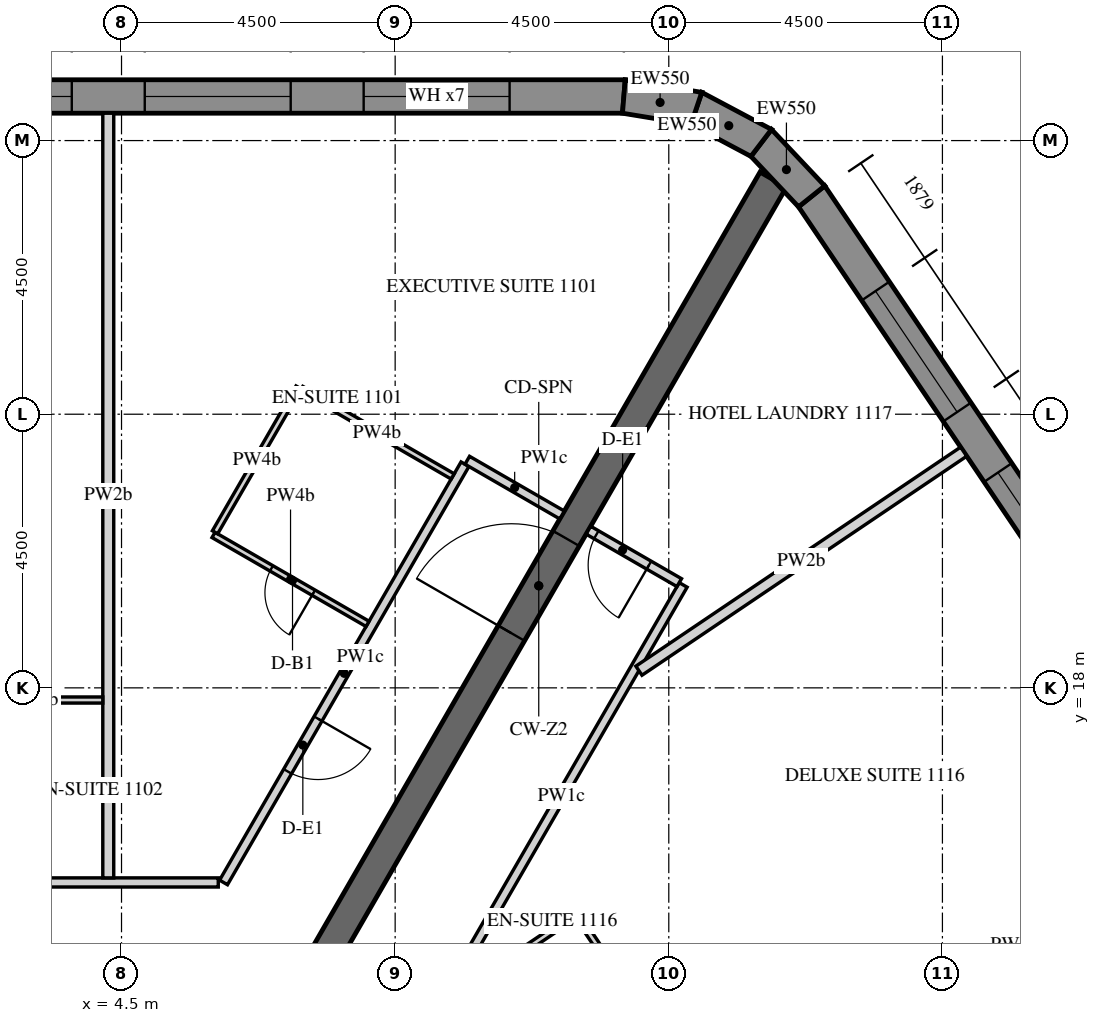
"""IFC4 building model, lengths in metres.
Left out: names, types, materials, properties, quantities, classifications, styles, units other than length and angle.
Written with IfcOpenShell. Run it as: python <this file> out.ifc"""

import sys

from ifc_helpers import new_model, si_unit, direction, frame, frame_2d, origin, place, context, subcontext, project, spatial, polyline, rectangle, outline, extrude, element, fill, save


model = new_model("IFC4")
c1 = context("Model", 3, precision=1e-05, world=origin(), true_north=direction((0.0, 1.0)))
c2 = subcontext(c1, "Body", "Model", "MODEL_VIEW")
j1 = project(units=[si_unit("LENGTHUNIT", "METRE"), si_unit("PLANEANGLEUNIT", "RADIAN")], contexts=[c1])
p1 = place(None, origin())
s1 = spatial("IfcSite", under=j1, at=p1, CompositionType="ELEMENT")
p2 = place(p1, origin())
s2 = spatial("IfcBuilding", under=s1, at=p2, CompositionType="ELEMENT")
p3 = place(p2, frame((0.0, 0.0, 156.6)))
s3 = spatial("IfcBuildingStorey", under=s2, at=p3, CompositionType="ELEMENT", Elevation=156.6)
p4 = place(p3, frame((12.761, 27.725, -0.15), z_axis=(0.0, 0.0, 1.0), x_axis=(-1.0, 0.0, 0.0)))
e1 = element("IfcWall", 1, at=p4, inside=s3, PredefinedType="SOLIDWALL", context=c2, shape_type="SweptSolid", body=[
    extrude(outline(polyline([(-0.022, -0.275), (27.783, -0.275), (27.732, 0.275), (0.022, 0.275), (-0.022, -0.275)])), origin(), (0.0, 0.0, 1.0), 3.9),
])
p5 = place(p4, frame((1.879, 0.0, 1.05)))
e2 = element("IfcOpeningElement", 2, at=p5, cuts=e1, PredefinedType="OPENING", context=c2, shape_type="SweptSolid", body=[
    extrude(rectangle(XDim=2.4, YDim=2.4, at=frame_2d((1.2, 1.2))), frame((0.0, 0.285, 0.0), z_axis=(0.0, -1.0, 0.0), x_axis=(1.0, 0.0, 0.0)), (0.0, 0.0, 1.0), 0.57),
])
p6 = place(p4, frame((5.479, 0.0, 1.05)))
e3 = element("IfcOpeningElement", 3, at=p6, cuts=e1, PredefinedType="OPENING", context=c2, shape_type="SweptSolid", body=[
    extrude(rectangle(XDim=2.4, YDim=2.4, at=frame_2d((1.2, 1.2))), frame((0.0, 0.285, 0.0), z_axis=(0.0, -1.0, 0.0), x_axis=(1.0, 0.0, 0.0)), (0.0, 0.0, 1.0), 0.57),
])
p7 = place(p4, frame((9.079, 0.0, 1.05)))
e4 = element("IfcOpeningElement", 4, at=p7, cuts=e1, PredefinedType="OPENING", context=c2, shape_type="SweptSolid", body=[
    extrude(rectangle(XDim=2.4, YDim=2.4, at=frame_2d((1.2, 1.2))), frame((0.0, 0.285, 0.0), z_axis=(0.0, -1.0, 0.0), x_axis=(1.0, 0.0, 0.0)), (0.0, 0.0, 1.0), 0.57),
])
p8 = place(p4, frame((12.679, 0.0, 1.05)))
e5 = element("IfcOpeningElement", 5, at=p8, cuts=e1, PredefinedType="OPENING", context=c2, shape_type="SweptSolid", body=[
    extrude(rectangle(XDim=2.4, YDim=2.4, at=frame_2d((1.2, 1.2))), frame((0.0, 0.285, 0.0), z_axis=(0.0, -1.0, 0.0), x_axis=(1.0, 0.0, 0.0)), (0.0, 0.0, 1.0), 0.57),
])
p9 = place(p4, frame((16.279, 0.0, 1.05)))
e6 = element("IfcOpeningElement", 6, at=p9, cuts=e1, PredefinedType="OPENING", context=c2, shape_type="SweptSolid", body=[
    extrude(rectangle(XDim=2.4, YDim=2.4, at=frame_2d((1.2, 1.2))), frame((0.0, 0.285, 0.0), z_axis=(0.0, -1.0, 0.0), x_axis=(1.0, 0.0, 0.0)), (0.0, 0.0, 1.0), 0.57),
])
p10 = place(p4, frame((19.879, 0.0, 1.05)))
e7 = element("IfcOpeningElement", 7, at=p10, cuts=e1, PredefinedType="OPENING", context=c2, shape_type="SweptSolid", body=[
    extrude(rectangle(XDim=2.4, YDim=2.4, at=frame_2d((1.2, 1.2))), frame((0.0, 0.285, 0.0), z_axis=(0.0, -1.0, 0.0), x_axis=(1.0, 0.0, 0.0)), (0.0, 0.0, 1.0), 0.57),
])
p11 = place(p4, frame((23.479, 0.0, 1.05)))
e8 = element("IfcOpeningElement", 8, at=p11, cuts=e1, PredefinedType="OPENING", context=c2, shape_type="SweptSolid", body=[
    extrude(rectangle(XDim=2.4, YDim=2.4, at=frame_2d((1.2, 1.2))), frame((0.0, 0.285, 0.0), z_axis=(0.0, -1.0, 0.0), x_axis=(1.0, 0.0, 0.0)), (0.0, 0.0, 1.0), 0.57),
])
p12 = place(p3, frame((31.371, 3.071, -0.15), z_axis=(0.0, 0.0, 1.0), x_axis=(-0.559189891278, 0.829039604297, 0.0)))
e9 = element("IfcWall", 9, at=p12, inside=s3, PredefinedType="SOLIDWALL", context=c2, shape_type="SweptSolid", body=[
    extrude(outline(polyline([(-0.026, -0.275), (27.781, -0.275), (27.736, 0.275), (0.026, 0.275), (-0.026, -0.275)])), origin(), (0.0, 0.0, 1.0), 3.9),
])
p13 = place(p12, frame((1.879, 0.0, 1.05)))
e10 = element("IfcOpeningElement", 10, at=p13, cuts=e9, PredefinedType="OPENING", context=c2, shape_type="SweptSolid", body=[
    extrude(rectangle(XDim=2.4, YDim=2.4, at=frame_2d((1.2, 1.2))), frame((0.0, 0.285, 0.0), z_axis=(0.0, -1.0, 0.0), x_axis=(1.0, 0.0, 0.0)), (0.0, 0.0, 1.0), 0.57),
])
p14 = place(p12, frame((5.479, 0.0, 1.05)))
e11 = element("IfcOpeningElement", 11, at=p14, cuts=e9, PredefinedType="OPENING", context=c2, shape_type="SweptSolid", body=[
    extrude(rectangle(XDim=2.4, YDim=2.4, at=frame_2d((1.2, 1.2))), frame((0.0, 0.285, 0.0), z_axis=(0.0, -1.0, 0.0), x_axis=(1.0, 0.0, 0.0)), (0.0, 0.0, 1.0), 0.57),
])
p15 = place(p12, frame((9.079, 0.0, 1.05)))
e12 = element("IfcOpeningElement", 12, at=p15, cuts=e9, PredefinedType="OPENING", context=c2, shape_type="SweptSolid", body=[
    extrude(rectangle(XDim=2.4, YDim=2.4, at=frame_2d((1.2, 1.2))), frame((0.0, 0.285, 0.0), z_axis=(0.0, -1.0, 0.0), x_axis=(1.0, 0.0, 0.0)), (0.0, 0.0, 1.0), 0.57),
])
p16 = place(p12, frame((12.679, 0.0, 1.05)))
e13 = element("IfcOpeningElement", 13, at=p16, cuts=e9, PredefinedType="OPENING", context=c2, shape_type="SweptSolid", body=[
    extrude(rectangle(XDim=2.4, YDim=2.4, at=frame_2d((1.2, 1.2))), frame((0.0, 0.285, 0.0), z_axis=(0.0, -1.0, 0.0), x_axis=(1.0, 0.0, 0.0)), (0.0, 0.0, 1.0), 0.57),
])
p17 = place(p12, frame((16.279, 0.0, 1.05)))
e14 = element("IfcOpeningElement", 14, at=p17, cuts=e9, PredefinedType="OPENING", context=c2, shape_type="SweptSolid", body=[
    extrude(rectangle(XDim=2.4, YDim=2.4, at=frame_2d((1.2, 1.2))), frame((0.0, 0.285, 0.0), z_axis=(0.0, -1.0, 0.0), x_axis=(1.0, 0.0, 0.0)), (0.0, 0.0, 1.0), 0.57),
])
p18 = place(p12, frame((19.879, 0.0, 1.05)))
e15 = element("IfcOpeningElement", 15, at=p18, cuts=e9, PredefinedType="OPENING", context=c2, shape_type="SweptSolid", body=[
    extrude(rectangle(XDim=2.4, YDim=2.4, at=frame_2d((1.2, 1.2))), frame((0.0, 0.285, 0.0), z_axis=(0.0, -1.0, 0.0), x_axis=(1.0, 0.0, 0.0)), (0.0, 0.0, 1.0), 0.57),
])
p19 = place(p12, frame((23.479, 0.0, 1.05)))
e16 = element("IfcOpeningElement", 16, at=p19, cuts=e9, PredefinedType="OPENING", context=c2, shape_type="SweptSolid", body=[
    extrude(rectangle(XDim=2.4, YDim=2.4, at=frame_2d((1.2, 1.2))), frame((0.0, 0.285, 0.0), z_axis=(0.0, -1.0, 0.0), x_axis=(1.0, 0.0, 0.0)), (0.0, 0.0, 1.0), 0.57),
])
p20 = place(p3, frame((15.849, 26.083, -0.15), z_axis=(0.0, 0.0, 1.0), x_axis=(-0.686196220404, 0.727416488061, 0.0)))
e17 = element("IfcWall", 17, at=p20, inside=s3, PredefinedType="SOLIDWALL", context=c2, shape_type="SweptSolid", body=[
    extrude(outline(polyline([(-0.022, -0.275), (1.253, -0.275), (1.163, 0.275), (0.022, 0.275), (-0.022, -0.275)])), origin(), (0.0, 0.0, 1.0), 3.9),
])
p21 = place(p3, frame((15.02, 26.962, -0.15), z_axis=(0.0, 0.0, 1.0), x_axis=(-0.882950818639, 0.469465495926, 0.0)))
e18 = element("IfcWall", 18, at=p21, inside=s3, PredefinedType="SOLIDWALL", context=c2, shape_type="SweptSolid", body=[
    extrude(outline(polyline([(-0.045, -0.275), (1.253, -0.275), (1.163, 0.275), (0.045, 0.275), (-0.045, -0.275)])), origin(), (0.0, 0.0, 1.0), 3.9),
])
p22 = place(p3, frame((13.953, 27.529, -0.15), z_axis=(0.0, 0.0, 1.0), x_axis=(-0.986751945211, 0.162236243244, 0.0)))
e19 = element("IfcWall", 19, at=p22, inside=s3, PredefinedType="SOLIDWALL", context=c2, shape_type="SweptSolid", body=[
    extrude(outline(polyline([(-0.045, -0.275), (1.231, -0.275), (1.186, 0.275), (0.045, 0.275), (-0.045, -0.275)])), origin(), (0.0, 0.0, 1.0), 3.9),
])
p23 = place(p3, frame((7.506, 13.0, -0.15), z_axis=(0.0, 0.0, 1.0), x_axis=(0.499988271576, 0.866032175087, 0.0)))
e20 = element("IfcWall", 20, at=p23, inside=s3, PredefinedType="SHEAR", context=c2, shape_type="SweptSolid", body=[
    extrude(rectangle(XDim=15.424, YDim=0.5, at=frame_2d((7.712, 0.0))), origin(), (0.0, 0.0, 1.0), 3.9),
])
p24 = place(p23, frame((6.812, 0.0, 0.15)))
e21 = element("IfcOpeningElement", 21, at=p24, cuts=e20, PredefinedType="OPENING", context=c2, shape_type="SweptSolid", body=[
    extrude(rectangle(XDim=1.8, YDim=2.4, at=frame_2d((0.9, 1.2))), frame((0.0, 0.26, 0.0), z_axis=(0.0, -1.0, 0.0), x_axis=(1.0, 0.0, 0.0)), (0.0, 0.0, 1.0), 0.52),
])
p25 = place(p3, frame((10.149, 21.678, 0.0), z_axis=(0.0, 0.0, 1.0), x_axis=(-0.499997422768, -0.866026891745, 0.0)))
e22 = element("IfcWall", 22, at=p25, inside=s3, PredefinedType="PARTITIONING", context=c2, shape_type="SweptSolid", body=[
    extrude(rectangle(XDim=7.942, YDim=0.15, at=frame_2d((3.971, 0.0))), origin(), (0.0, 0.0, 1.0), 2.823),
])
p26 = place(p25, frame((4.833, 0.0, 0.0)))
e23 = element("IfcOpeningElement", 23, at=p26, cuts=e22, PredefinedType="OPENING", context=c2, shape_type="SweptSolid", body=[
    extrude(rectangle(XDim=1.0, YDim=2.1, at=frame_2d((0.5, 1.05))), frame((0.0, 0.085, 0.0), z_axis=(0.0, -1.0, 0.0), x_axis=(1.0, 0.0, 0.0)), (0.0, 0.0, 1.0), 0.17),
])
p27 = place(p3, frame((6.091, 14.8, 0.0), z_axis=(0.0, 0.0, 1.0), x_axis=(-1.0, 0.0, 0.0)))
e24 = element("IfcWall", 24, at=p27, inside=s3, PredefinedType="PARTITIONING", context=c2, shape_type="SweptSolid", body=[
    extrude(rectangle(XDim=14.636, YDim=0.15, at=frame_2d((7.318, 0.0))), origin(), (0.0, 0.0, 1.0), 2.823),
])
p28 = place(p27, frame((7.909, 0.0, 0.0)))
e25 = element("IfcOpeningElement", 25, at=p28, cuts=e24, PredefinedType="OPENING", context=c2, shape_type="SweptSolid", body=[
    extrude(rectangle(XDim=1.0, YDim=2.1, at=frame_2d((0.5, 1.05))), frame((0.0, 0.085, 0.0), z_axis=(0.0, -1.0, 0.0), x_axis=(1.0, 0.0, 0.0)), (0.0, 0.0, 1.0), 0.17),
])
p29 = place(p3, frame((11.745, 20.843, 0.0), z_axis=(0.0, 0.0, 1.0), x_axis=(-0.865989075817, 0.500062916607, 0.0)))
e26 = element("IfcWall", 26, at=p29, inside=s3, PredefinedType="PARTITIONING", context=c2, shape_type="SweptSolid", body=[
    extrude(rectangle(XDim=1.8, YDim=0.15, at=frame_2d((0.9, 0.0))), origin(), (0.0, 0.0, 1.0), 2.823),
])
p30 = place(p3, frame((9.728, 12.75, 0.0), z_axis=(0.0, 0.0, 1.0), x_axis=(0.500007149838, 0.866021275784, 0.0)))
e27 = element("IfcWall", 27, at=p30, inside=s3, PredefinedType="PARTITIONING", context=c2, shape_type="SweptSolid", body=[
    extrude(rectangle(XDim=8.017, YDim=0.15, at=frame_2d((4.009, 0.0))), origin(), (0.0, 0.0, 1.0), 2.823),
])
p31 = place(p3, frame((13.672, 19.73, 0.0), z_axis=(0.0, 0.0, 1.0), x_axis=(-0.866074815912, 0.499914405916, 0.0)))
e28 = element("IfcWall", 28, at=p31, inside=s3, PredefinedType="PARTITIONING", context=c2, shape_type="SweptSolid", body=[
    extrude(rectangle(XDim=1.725, YDim=0.15, at=frame_2d((0.862, 0.0))), origin(), (0.0, 0.0, 1.0), 2.823),
])
p32 = place(p31, frame((0.575, 0.0, 0.0)))
e29 = element("IfcOpeningElement", 29, at=p32, cuts=e28, PredefinedType="OPENING", context=c2, shape_type="SweptSolid", body=[
    extrude(rectangle(XDim=1.0, YDim=2.1, at=frame_2d((0.5, 1.05))), frame((0.0, 0.085, 0.0), z_axis=(0.0, -1.0, 0.0), x_axis=(1.0, 0.0, 0.0)), (0.0, 0.0, 1.0), 0.17),
])
p33 = place(p3, frame((8.546, 19.052, 0.0), z_axis=(0.0, 0.0, 1.0), x_axis=(-0.866046596414, 0.499963291492, 0.0)))
e30 = element("IfcWall", 30, at=p33, inside=s3, PredefinedType="PARTITIONING", context=c2, shape_type="SweptSolid", body=[
    extrude(rectangle(XDim=2.925, YDim=0.1, at=frame_2d((1.462, 0.0))), origin(), (0.0, 0.0, 1.0), 2.823),
])
p34 = place(p33, frame((1.025, 0.0, 0.0)))
e31 = element("IfcOpeningElement", 31, at=p34, cuts=e30, PredefinedType="OPENING", context=c2, shape_type="SweptSolid", body=[
    extrude(rectangle(XDim=0.8, YDim=2.1, at=frame_2d((0.4, 1.05))), frame((0.0, 0.06, 0.0), z_axis=(0.0, -1.0, 0.0), x_axis=(1.0, 0.0, 0.0)), (0.0, 0.0, 1.0), 0.12),
])
p35 = place(p3, frame((6.038, 20.558, 0.0), z_axis=(0.0, 0.0, 1.0), x_axis=(0.499996545922, 0.866027397988, 0.0)))
e32 = element("IfcWall", 32, at=p35, inside=s3, PredefinedType="PARTITIONING", context=c2, shape_type="SweptSolid", body=[
    extrude(rectangle(XDim=2.75, YDim=0.1, at=frame_2d((1.375, 0.0))), origin(), (0.0, 0.0, 1.0), 2.823),
])
p36 = place(p3, frame((7.456, 22.915, 0.0), z_axis=(0.0, 0.0, 1.0), x_axis=(0.866018712932, -0.500011588718, 0.0)))
e33 = element("IfcWall", 33, at=p36, inside=s3, PredefinedType="PARTITIONING", context=c2, shape_type="SweptSolid", body=[
    extrude(rectangle(XDim=2.875, YDim=0.1, at=frame_2d((1.438, 0.0))), origin(), (0.0, 0.0, 1.0), 2.823),
])
p37 = place(p3, frame((4.282, 27.45, 0.0), z_axis=(0.0, 0.0, 1.0), x_axis=(0.0, -1.0, 0.0)))
e34 = element("IfcWall", 34, at=p37, inside=s3, PredefinedType="PARTITIONING", context=c2, shape_type="SweptSolid", body=[
    extrude(rectangle(XDim=12.575, YDim=0.18, at=frame_2d((6.288, 0.0))), origin(), (0.0, 0.0, 1.0), 2.823),
])
p38 = place(p3, frame((1.932, 17.8, 0.0), z_axis=(0.0, 0.0, 1.0), x_axis=(1.0, 0.0, 0.0)))
e35 = element("IfcWall", 35, at=p38, inside=s3, PredefinedType="PARTITIONING", context=c2, shape_type="SweptSolid", body=[
    extrude(rectangle(XDim=2.26, YDim=0.1, at=frame_2d((1.13, 0.0))), origin(), (0.0, 0.0, 1.0), 2.823),
])
p39 = place(p3, frame((9.87, 12.846, 0.0), z_axis=(0.0, 0.0, 1.0), x_axis=(0.829045266323, 0.559181496821, 0.0)))
e36 = element("IfcWall", 36, at=p39, inside=s3, PredefinedType="PARTITIONING", context=c2, shape_type="SweptSolid", body=[
    extrude(rectangle(XDim=2.548, YDim=0.1, at=frame_2d((1.274, 0.0))), origin(), (0.0, 0.0, 1.0), 2.823),
])
p40 = place(p3, frame((12.01, 14.229, 0.0), z_axis=(0.0, 0.0, 1.0), x_axis=(0.559158698756, -0.8290606429, 0.0)))
e37 = element("IfcWall", 37, at=p40, inside=s3, PredefinedType="PARTITIONING", context=c2, shape_type="SweptSolid", body=[
    extrude(rectangle(XDim=2.75, YDim=0.1, at=frame_2d((1.375, 0.0))), origin(), (0.0, 0.0, 1.0), 2.823),
])
p41 = place(p3, frame((16.003, 11.617, 0.0), z_axis=(0.0, 0.0, 1.0), x_axis=(0.829037886281, 0.559192438352, 0.0)))
e38 = element("IfcWall", 38, at=p41, inside=s3, PredefinedType="PARTITIONING", context=c2, shape_type="SweptSolid", body=[
    extrude(rectangle(XDim=7.687, YDim=0.1, at=frame_2d((3.843, 0.0))), origin(), (0.0, 0.0, 1.0), 2.823),
])
p42 = place(p3, frame((18.35, 21.884, 0.0), z_axis=(0.0, 0.0, 1.0), x_axis=(-0.829047205772, -0.559178621374, 0.0)))
e39 = element("IfcWall", 39, at=p42, inside=s3, PredefinedType="PARTITIONING", context=c2, shape_type="SweptSolid", body=[
    extrude(rectangle(XDim=6.442, YDim=0.18, at=frame_2d((3.221, 0.0))), origin(), (0.0, 0.0, 1.0), 2.823),
])
p43 = place(p5, frame((0.0, 0.205, 0.0)))
e40 = element("IfcWindow", 40, at=p43, inside=s3, PartitioningType="DOUBLE_PANEL_VERTICAL", PredefinedType="WINDOW", context=c2, shape_type="SweptSolid", body=[
    extrude(rectangle(XDim=2.4, YDim=2.4, at=frame_2d((1.2, 1.2))), frame((0.0, 0.03, 0.0), z_axis=(0.0, -1.0, 0.0), x_axis=(1.0, 0.0, 0.0)), (0.0, 0.0, 1.0), 0.06),
])
fill(e2, e40)
p44 = place(p6, frame((0.0, 0.205, 0.0)))
e41 = element("IfcWindow", 41, at=p44, inside=s3, PartitioningType="DOUBLE_PANEL_VERTICAL", PredefinedType="WINDOW", context=c2, shape_type="SweptSolid", body=[
    extrude(rectangle(XDim=2.4, YDim=2.4, at=frame_2d((1.2, 1.2))), frame((0.0, 0.03, 0.0), z_axis=(0.0, -1.0, 0.0), x_axis=(1.0, 0.0, 0.0)), (0.0, 0.0, 1.0), 0.06),
])
fill(e3, e41)
p45 = place(p7, frame((0.0, 0.205, 0.0)))
e42 = element("IfcWindow", 42, at=p45, inside=s3, PartitioningType="DOUBLE_PANEL_VERTICAL", PredefinedType="WINDOW", context=c2, shape_type="SweptSolid", body=[
    extrude(rectangle(XDim=2.4, YDim=2.4, at=frame_2d((1.2, 1.2))), frame((0.0, 0.03, 0.0), z_axis=(0.0, -1.0, 0.0), x_axis=(1.0, 0.0, 0.0)), (0.0, 0.0, 1.0), 0.06),
])
fill(e4, e42)
p46 = place(p18, frame((0.0, 0.205, 0.0)))
e43 = element("IfcWindow", 43, at=p46, inside=s3, PartitioningType="DOUBLE_PANEL_VERTICAL", PredefinedType="WINDOW", context=c2, shape_type="SweptSolid", body=[
    extrude(rectangle(XDim=2.4, YDim=2.4, at=frame_2d((1.2, 1.2))), frame((0.0, 0.03, 0.0), z_axis=(0.0, -1.0, 0.0), x_axis=(1.0, 0.0, 0.0)), (0.0, 0.0, 1.0), 0.06),
])
fill(e15, e43)
p47 = place(p19, frame((0.0, 0.205, 0.0)))
e44 = element("IfcWindow", 44, at=p47, inside=s3, PartitioningType="DOUBLE_PANEL_VERTICAL", PredefinedType="WINDOW", context=c2, shape_type="SweptSolid", body=[
    extrude(rectangle(XDim=2.4, YDim=2.4, at=frame_2d((1.2, 1.2))), frame((0.0, 0.03, 0.0), z_axis=(0.0, -1.0, 0.0), x_axis=(1.0, 0.0, 0.0)), (0.0, 0.0, 1.0), 0.06),
])
fill(e16, e44)
p48 = place(p24, origin())
e45 = element("IfcDoor", 45, at=p48, inside=s3, OperationType="DOUBLE_DOOR_SINGLE_SWING", PredefinedType="DOOR", context=c2, shape_type="SweptSolid", body=[
    extrude(rectangle(XDim=1.8, YDim=2.4, at=frame_2d((0.9, 1.2))), frame((0.0, 0.025, 0.0), z_axis=(0.0, -1.0, 0.0), x_axis=(1.0, 0.0, 0.0)), (0.0, 0.0, 1.0), 0.05),
])
fill(e21, e45)
p49 = place(p26, origin())
e46 = element("IfcDoor", 46, at=p49, inside=s3, OperationType="SINGLE_SWING_LEFT", PredefinedType="DOOR", context=c2, shape_type="SweptSolid", body=[
    extrude(rectangle(XDim=1.0, YDim=2.1, at=frame_2d((0.5, 1.05))), frame((0.0, 0.025, 0.0), z_axis=(0.0, -1.0, 0.0), x_axis=(1.0, 0.0, 0.0)), (0.0, 0.0, 1.0), 0.05),
])
fill(e23, e46)
p50 = place(p34, origin())
e47 = element("IfcDoor", 47, at=p50, inside=s3, OperationType="SINGLE_SWING_RIGHT", PredefinedType="DOOR", context=c2, shape_type="SweptSolid", body=[
    extrude(rectangle(XDim=0.8, YDim=2.1, at=frame_2d((0.4, 1.05))), frame((0.0, 0.025, 0.0), z_axis=(0.0, -1.0, 0.0), x_axis=(1.0, 0.0, 0.0)), (0.0, 0.0, 1.0), 0.05),
])
fill(e31, e47)
p51 = place(p32, origin())
e48 = element("IfcDoor", 48, at=p51, inside=s3, OperationType="SINGLE_SWING_LEFT", PredefinedType="DOOR", context=c2, shape_type="SweptSolid", body=[
    extrude(rectangle(XDim=1.0, YDim=2.1, at=frame_2d((0.5, 1.05))), frame((0.0, 0.025, 0.0), z_axis=(0.0, -1.0, 0.0), x_axis=(1.0, 0.0, 0.0)), (0.0, 0.0, 1.0), 0.05),
])
fill(e29, e48)
save(model, sys.argv[1])
